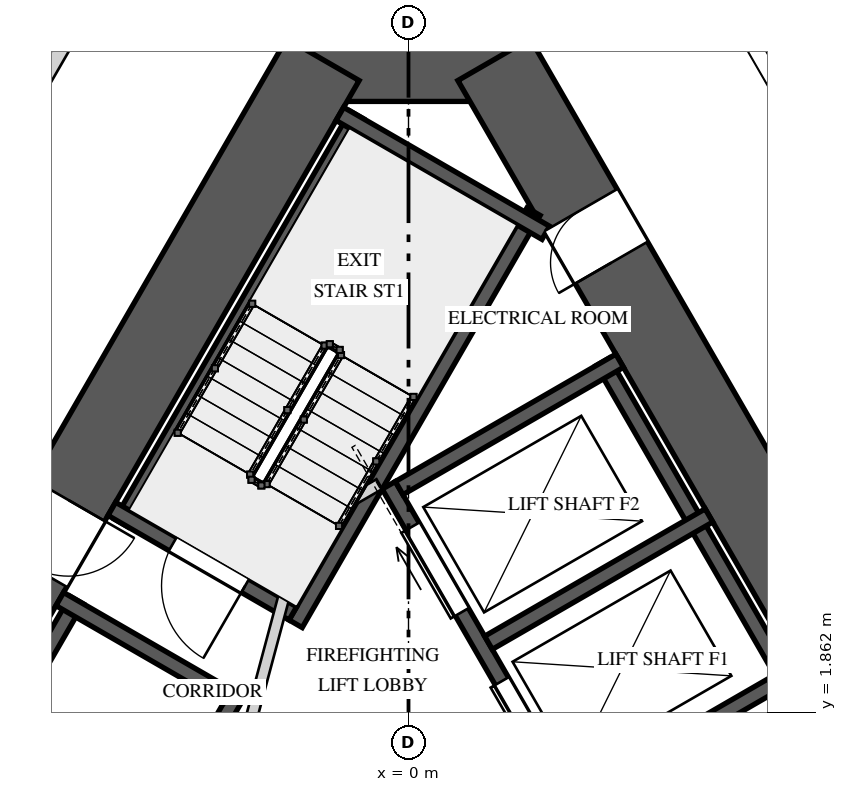
"""IFC4 building model, lengths in metres.
Left out: names, types, materials, properties, quantities, classifications, styles, units other than length and angle.
Written with IfcOpenShell. Run it as: python <this file> out.ifc"""

import sys

from ifc_helpers import new_model, si_unit, direction, frame, frame_2d, origin, place, context, subcontext, project, spatial, polyline, rectangle, outline, extrude, element, fill, save


model = new_model("IFC4")
c1 = context("Model", 3, precision=1e-05, world=origin(), true_north=direction((0.0, 1.0)))
c2 = subcontext(c1, "Body", "Model", "MODEL_VIEW")
j1 = project(units=[si_unit("LENGTHUNIT", "METRE"), si_unit("PLANEANGLEUNIT", "RADIAN")], contexts=[c1])
p1 = place(None, origin())
s1 = spatial("IfcSite", under=j1, at=p1, CompositionType="ELEMENT")
p2 = place(p1, origin())
s2 = spatial("IfcBuilding", under=s1, at=p2, CompositionType="ELEMENT")
p3 = place(p2, frame((0.0, 0.0, 25.0)))
s3 = spatial("IfcBuildingStorey", under=s2, at=p3, CompositionType="ELEMENT", Elevation=25.0)
p4 = place(p3, frame((1.443, 10.45, 0.0), z_axis=(0.0, 0.0, 1.0), x_axis=(-1.0, 0.0, 0.0)))
e1 = element("IfcWall", 1, at=p4, inside=s3, PredefinedType="SHEAR", context=c2, shape_type="SweptSolid", body=[
    extrude(rectangle(XDim=2.887, YDim=1.1, at=frame_2d((1.443, 0.0))), origin(), (0.0, 0.0, 1.0), 5.0),
])
p5 = place(p3, frame((-1.126, 10.45, 0.0), z_axis=(0.0, 0.0, 1.0), x_axis=(-0.500001757713, -0.866024388966, 0.0)))
e2 = element("IfcWall", 2, at=p5, inside=s3, PredefinedType="SHEAR", context=c2, shape_type="SweptSolid", body=[
    extrude(rectangle(XDim=16.974, YDim=1.1, at=frame_2d((8.487, 0.0))), origin(), (0.0, 0.0, 1.0), 5.0),
])
p6 = place(p5, frame((6.692, 0.0, 0.0)))
e3 = element("IfcOpeningElement", 3, at=p6, cuts=e2, PredefinedType="OPENING", context=c2, shape_type="SweptSolid", body=[
    extrude(rectangle(XDim=1.0, YDim=2.4, at=frame_2d((0.5, 1.2))), frame((0.0, 0.56, 0.0), z_axis=(0.0, -1.0, 0.0), x_axis=(1.0, 0.0, 0.0)), (0.0, 0.0, 1.0), 1.12),
])
p7 = place(p3, frame((9.613, -4.25, 0.0), z_axis=(0.0, 0.0, 1.0), x_axis=(-0.500001757713, 0.866024388966, 0.0)))
e4 = element("IfcWall", 4, at=p7, inside=s3, PredefinedType="SHEAR", context=c2, shape_type="SweptSolid", body=[
    extrude(rectangle(XDim=16.974, YDim=1.1, at=frame_2d((8.487, 0.0))), origin(), (0.0, 0.0, 1.0), 5.0),
])
p8 = place(p7, frame((6.762, 0.0, 0.0)))
e5 = element("IfcOpeningElement", 5, at=p8, cuts=e4, PredefinedType="OPENING", context=c2, shape_type="SweptSolid", body=[
    extrude(rectangle(XDim=1.0, YDim=2.4, at=frame_2d((0.5, 1.2))), frame((0.0, 0.56, 0.0), z_axis=(0.0, -1.0, 0.0), x_axis=(1.0, 0.0, 0.0)), (0.0, 0.0, 1.0), 1.12),
])
p9 = place(p7, frame((13.889, 0.0, 0.0)))
e6 = element("IfcOpeningElement", 6, at=p9, cuts=e4, PredefinedType="OPENING", context=c2, shape_type="SweptSolid", body=[
    extrude(rectangle(XDim=0.8, YDim=2.1, at=frame_2d((0.4, 1.05))), frame((0.0, 0.56, 0.0), z_axis=(0.0, -1.0, 0.0), x_axis=(1.0, 0.0, 0.0)), (0.0, 0.0, 1.0), 1.12),
])
p10 = place(p3, frame((-0.68, 9.722, 0.0), z_axis=(0.0, 0.0, 1.0), x_axis=(-0.49998037582, -0.866036733513, 0.0)))
e7 = element("IfcWall", 7, at=p10, inside=s3, PredefinedType="SOLIDWALL", context=c2, shape_type="SweptSolid", body=[
    extrude(rectangle(XDim=6.2, YDim=0.2, at=frame_2d((3.1, 0.0))), origin(), (0.0, 0.0, 1.0), 4.65),
])
p11 = place(p3, frame((1.646, 8.45, 0.0), z_axis=(0.0, 0.0, 1.0), x_axis=(-0.500006002103, -0.866021938441, 0.0)))
e8 = element("IfcWall", 8, at=p11, inside=s3, PredefinedType="SOLIDWALL", context=c2, shape_type="SweptSolid", body=[
    extrude(rectangle(XDim=6.261, YDim=0.2, at=frame_2d((3.13, 0.0))), origin(), (0.0, 0.0, 1.0), 4.65),
])
p12 = place(p3, frame((1.806, 8.172, 0.0), z_axis=(0.0, 0.0, 1.0), x_axis=(-0.866054327916, 0.499949898588, 0.0)))
e9 = element("IfcWall", 9, at=p12, inside=s3, PredefinedType="SOLIDWALL", context=c2, shape_type="SweptSolid", body=[
    extrude(rectangle(XDim=3.128, YDim=0.2, at=frame_2d((1.564, 0.0))), origin(), (0.0, 0.0, 1.0), 4.65),
])
p13 = place(p3, frame((-1.521, 3.165, 0.0), z_axis=(0.0, 0.0, 1.0), x_axis=(-0.866027397988, 0.499996545922, 0.0)))
e10 = element("IfcWall", 10, at=p13, inside=s3, PredefinedType="SOLIDWALL", context=c2, shape_type="SweptSolid", body=[
    extrude(rectangle(XDim=2.75, YDim=0.2, at=frame_2d((1.375, 0.0))), origin(), (0.0, 0.0, 1.0), 4.65),
])
p14 = place(p13, frame((0.725, 0.0, 0.0)))
e11 = element("IfcOpeningElement", 11, at=p14, cuts=e10, PredefinedType="OPENING", context=c2, shape_type="SweptSolid", body=[
    extrude(rectangle(XDim=1.1, YDim=2.4, at=frame_2d((0.55, 1.2))), frame((0.0, 0.11, 0.0), z_axis=(0.0, -1.0, 0.0), x_axis=(1.0, 0.0, 0.0)), (0.0, 0.0, 1.0), 0.22),
])
p15 = place(p3, frame((-4.993, -2.648, 0.0), z_axis=(0.0, 0.0, 1.0), x_axis=(0.499996545922, 0.866027397988, 0.0)))
e12 = element("IfcWall", 12, at=p15, inside=s3, PredefinedType="SOLIDWALL", context=c2, shape_type="SweptSolid", body=[
    extrude(rectangle(XDim=5.5, YDim=0.2, at=frame_2d((2.75, 0.0))), origin(), (0.0, 0.0, 1.0), 4.65),
])
p16 = place(p15, frame((3.12, 0.0, 0.0)))
e13 = element("IfcOpeningElement", 13, at=p16, cuts=e12, PredefinedType="OPENING", context=c2, shape_type="SweptSolid", body=[
    extrude(rectangle(XDim=0.95, YDim=2.4, at=frame_2d((0.475, 1.2))), frame((0.0, 0.11, 0.0), z_axis=(0.0, -1.0, 0.0), x_axis=(1.0, 0.0, 0.0)), (0.0, 0.0, 1.0), 0.22),
])
p17 = place(p15, frame((0.605, 0.0, 0.0)))
e14 = element("IfcOpeningElement", 14, at=p17, cuts=e12, PredefinedType="OPENING", context=c2, shape_type="SweptSolid", body=[
    extrude(rectangle(XDim=0.8, YDim=2.1, at=frame_2d((0.4, 1.05))), frame((0.0, 0.11, 0.0), z_axis=(0.0, -1.0, 0.0), x_axis=(1.0, 0.0, 0.0)), (0.0, 0.0, 1.0), 0.22),
])
p18 = place(p3, frame((-4.365, 3.34, 0.0), z_axis=(0.0, 0.0, 1.0), x_axis=(-0.499996545922, -0.866027397988, 0.0)))
e15 = element("IfcWall", 15, at=p18, inside=s3, PredefinedType="SOLIDWALL", context=c2, shape_type="SweptSolid", body=[
    extrude(rectangle(XDim=5.5, YDim=0.2, at=frame_2d((2.75, 0.0))), origin(), (0.0, 0.0, 1.0), 4.65),
])
p19 = place(p3, frame((-2.38, 2.078, 0.0), z_axis=(0.0, 0.0, 1.0), x_axis=(-0.866054858364, 0.499948979701, 0.0)))
e16 = element("IfcWall", 16, at=p19, inside=s3, PredefinedType="SOLIDWALL", context=c2, shape_type="SweptSolid", body=[
    extrude(rectangle(XDim=2.55, YDim=0.2, at=frame_2d((1.275, 0.0))), origin(), (0.0, 0.0, 1.0), 4.65),
])
p20 = place(p3, frame((2.19, 0.606, 0.0), z_axis=(0.0, 0.0, 1.0), x_axis=(-0.500002801628, 0.866023786258, 0.0)))
e17 = element("IfcWall", 17, at=p20, inside=s3, PredefinedType="SOLIDWALL", context=c2, shape_type="SweptSolid", body=[
    extrude(rectangle(XDim=4.9, YDim=0.2, at=frame_2d((2.45, 0.0))), origin(), (0.0, 0.0, 1.0), 4.65),
])
p21 = place(p20, frame((0.625, 0.0, 0.0)))
e18 = element("IfcOpeningElement", 18, at=p21, cuts=e17, PredefinedType="OPENING", context=c2, shape_type="SweptSolid", body=[
    extrude(rectangle(XDim=1.3, YDim=2.1, at=frame_2d((0.65, 1.05))), frame((0.0, 0.11, 0.0), z_axis=(0.0, -1.0, 0.0), x_axis=(1.0, 0.0, 0.0)), (0.0, 0.0, 1.0), 0.22),
])
p22 = place(p20, frame((2.975, 0.0, 0.0)))
e19 = element("IfcOpeningElement", 19, at=p22, cuts=e17, PredefinedType="OPENING", context=c2, shape_type="SweptSolid", body=[
    extrude(rectangle(XDim=1.3, YDim=2.1, at=frame_2d((0.65, 1.05))), frame((0.0, 0.11, 0.0), z_axis=(0.0, -1.0, 0.0), x_axis=(1.0, 0.0, 0.0)), (0.0, 0.0, 1.0), 0.22),
])
p23 = place(p3, frame((5.005, 2.231, 0.0), z_axis=(0.0, 0.0, 1.0), x_axis=(-0.500002801628, 0.866023786258, 0.0)))
e20 = element("IfcWall", 20, at=p23, inside=s3, PredefinedType="SOLIDWALL", context=c2, shape_type="SweptSolid", body=[
    extrude(rectangle(XDim=4.9, YDim=0.2, at=frame_2d((2.45, 0.0))), origin(), (0.0, 0.0, 1.0), 4.65),
])
p24 = place(p3, frame((2.227, 0.743, 0.0), z_axis=(0.0, 0.0, 1.0), x_axis=(0.866014461049, 0.500018952895, 0.0)))
e21 = element("IfcWall", 21, at=p24, inside=s3, PredefinedType="SOLIDWALL", context=c2, shape_type="SweptSolid", body=[
    extrude(rectangle(XDim=3.35, YDim=0.2, at=frame_2d((1.675, 0.0))), origin(), (0.0, 0.0, 1.0), 4.65),
])
p25 = place(p3, frame((1.052, 2.778, 0.0), z_axis=(0.0, 0.0, 1.0), x_axis=(0.866032680314, 0.499987396469, 0.0)))
e22 = element("IfcWall", 22, at=p25, inside=s3, PredefinedType="SOLIDWALL", context=c2, shape_type="SweptSolid", body=[
    extrude(rectangle(XDim=3.35, YDim=0.2, at=frame_2d((1.675, 0.0))), origin(), (0.0, 0.0, 1.0), 4.65),
])
p26 = place(p3, frame((-0.123, 4.813, 0.0), z_axis=(0.0, 0.0, 1.0), x_axis=(0.866014461049, 0.500018952895, 0.0)))
e23 = element("IfcWall", 23, at=p26, inside=s3, PredefinedType="SOLIDWALL", context=c2, shape_type="SweptSolid", body=[
    extrude(rectangle(XDim=3.35, YDim=0.2, at=frame_2d((1.675, 0.0))), origin(), (0.0, 0.0, 1.0), 4.65),
])
p27 = place(p3, frame((-2.178, 1.372, 0.0), z_axis=(0.0, 0.0, 1.0), x_axis=(0.258808958833, 0.96592852884, 0.0)))
e24 = element("IfcWall", 24, at=p27, inside=s3, PredefinedType="PARTITIONING", context=c2, shape_type="SweptSolid", body=[
    extrude(rectangle(XDim=2.903, YDim=0.15, at=frame_2d((1.451, 0.0))), origin(), (0.0, 0.0, 1.0), 4.65),
])
p28 = place(p3, frame((-1.51, 4.215, 0.0), z_axis=(0.0, 0.0, 1.0), x_axis=(0.866085525409, 0.49989585183, 0.0)))
e25 = element("IfcWall", 25, at=p28, inside=s3, PredefinedType="PARTITIONING", context=c2, shape_type="SweptSolid", body=[
    extrude(rectangle(XDim=1.3, YDim=0.15, at=frame_2d((0.65, 0.0))), origin(), (0.0, 0.0, 1.0), 4.65),
])
p29 = place(p3, frame((4.528, 10.657, 0.0), z_axis=(0.0, 0.0, 1.0), x_axis=(0.500135544557, -0.865947132953, 0.0)))
e26 = element("IfcWall", 26, at=p29, inside=s3, PredefinedType="SOLIDWALL", context=c2, shape_type="SweptSolid", body=[
    extrude(outline(polyline([(0.0, 0.0), (1.518, 0.0), (1.518, 3.75), (0.568, 3.75), (0.568, 4.65), (0.0, 4.65), (0.0, 0.0)])), frame((0.0, 0.1, 0.0), z_axis=(0.0, -1.0, 0.0), x_axis=(1.0, 0.0, 0.0)), (0.0, 0.0, 1.0), 0.2),
])
p30 = place(p29, frame((0.05, 0.0, 0.0)))
e27 = element("IfcOpeningElement", 27, at=p30, cuts=e26, PredefinedType="OPENING", context=c2, shape_type="SweptSolid", body=[
    extrude(rectangle(XDim=1.1, YDim=2.4, at=frame_2d((0.55, 1.2))), frame((0.0, 0.11, 0.0), z_axis=(0.0, -1.0, 0.0), x_axis=(1.0, 0.0, 0.0)), (0.0, 0.0, 1.0), 0.22),
])
p31 = place(p3, frame((-4.812, 10.165, 0.0), z_axis=(0.0, 0.0, 1.0), x_axis=(0.500000186108, 0.866025296335, 0.0)))
e28 = element("IfcWall", 28, at=p31, inside=s3, PredefinedType="SOLIDWALL", context=c2, shape_type="SweptSolid", body=[
    extrude(rectangle(XDim=2.815, YDim=0.2, at=frame_2d((1.408, 0.0))), origin(), (0.0, 0.0, 1.0), 4.65),
])
p32 = place(p14, origin())
e29 = element("IfcDoor", 29, at=p32, inside=s3, OperationType="SINGLE_SWING_RIGHT", PredefinedType="DOOR", context=c2, shape_type="SweptSolid", body=[
    extrude(rectangle(XDim=1.1, YDim=2.4, at=frame_2d((0.55, 1.2))), frame((0.0, 0.025, 0.0), z_axis=(0.0, -1.0, 0.0), x_axis=(1.0, 0.0, 0.0)), (0.0, 0.0, 1.0), 0.05),
])
fill(e11, e29)
p33 = place(p21, origin())
e30 = element("IfcDoor", 30, at=p33, inside=s3, OperationType="SLIDING_TO_LEFT", PredefinedType="DOOR", context=c2, shape_type="SweptSolid", body=[
    extrude(rectangle(XDim=1.3, YDim=2.1, at=frame_2d((0.65, 1.05))), frame((0.0, 0.025, 0.0), z_axis=(0.0, -1.0, 0.0), x_axis=(1.0, 0.0, 0.0)), (0.0, 0.0, 1.0), 0.05),
])
fill(e18, e30)
p34 = place(p22, origin())
e31 = element("IfcDoor", 31, at=p34, inside=s3, OperationType="SLIDING_TO_RIGHT", PredefinedType="DOOR", context=c2, shape_type="SweptSolid", body=[
    extrude(rectangle(XDim=1.3, YDim=2.1, at=frame_2d((0.65, 1.05))), frame((0.0, 0.025, 0.0), z_axis=(0.0, -1.0, 0.0), x_axis=(1.0, 0.0, 0.0)), (0.0, 0.0, 1.0), 0.05),
])
fill(e19, e31)
p35 = place(p6, origin())
e32 = element("IfcDoor", 32, at=p35, inside=s3, OperationType="SINGLE_SWING_RIGHT", PredefinedType="DOOR", context=c2, shape_type="SweptSolid", body=[
    extrude(rectangle(XDim=1.0, YDim=2.4, at=frame_2d((0.5, 1.2))), frame((0.0, 0.025, 0.0), z_axis=(0.0, -1.0, 0.0), x_axis=(1.0, 0.0, 0.0)), (0.0, 0.0, 1.0), 0.05),
])
fill(e3, e32)
p36 = place(p9, origin())
e33 = element("IfcDoor", 33, at=p36, inside=s3, OperationType="SINGLE_SWING_RIGHT", PredefinedType="DOOR", context=c2, shape_type="SweptSolid", body=[
    extrude(rectangle(XDim=0.8, YDim=2.1, at=frame_2d((0.4, 1.05))), frame((0.0, 0.025, 0.0), z_axis=(0.0, -1.0, 0.0), x_axis=(1.0, 0.0, 0.0)), (0.0, 0.0, 1.0), 0.05),
])
fill(e6, e33)
p37 = place(p30, origin())
e34 = element("IfcDoor", 34, at=p37, inside=s3, OperationType="SINGLE_SWING_RIGHT", PredefinedType="DOOR", context=c2, shape_type="SweptSolid", body=[
    extrude(rectangle(XDim=1.1, YDim=2.4, at=frame_2d((0.55, 1.2))), frame((0.0, 0.025, 0.0), z_axis=(0.0, -1.0, 0.0), x_axis=(1.0, 0.0, 0.0)), (0.0, 0.0, 1.0), 0.05),
])
fill(e27, e34)
save(model, sys.argv[1])
